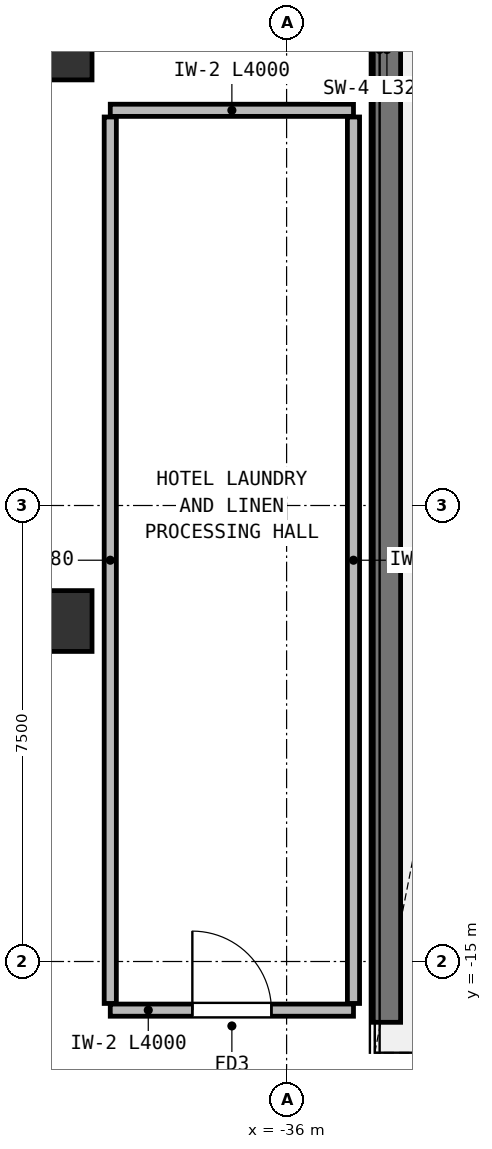
"""IFC4 building model, lengths in metres.
Left out: names, types, materials, properties, quantities, classifications, styles, units other than length and angle.
Written with IfcOpenShell. Run it as: python <this file> out.ifc"""

import sys

from ifc_helpers import new_model, si_unit, direction, frame, frame_2d, origin, origin_2d, place, context, subcontext, project, spatial, rectangle, extrude, element, fill, save


model = new_model("IFC4")
c1 = context("Model", 3, precision=1e-05, world=origin(), true_north=direction((0.0, 1.0)))
c2 = subcontext(c1, "Body", "Model", "MODEL_VIEW")
j1 = project(units=[si_unit("LENGTHUNIT", "METRE"), si_unit("PLANEANGLEUNIT", "RADIAN")], contexts=[c1])
p1 = place(None, origin())
s1 = spatial("IfcSite", under=j1, at=p1, CompositionType="ELEMENT")
p2 = place(p1, origin())
s2 = spatial("IfcBuilding", under=s1, at=p2, CompositionType="ELEMENT")
p3 = place(p2, frame((0.0, 0.0, -9.0)))
s3 = spatial("IfcBuildingStorey", under=s2, at=p3, CompositionType="ELEMENT", Elevation=-9.0)
p4 = place(p3, frame((-34.35, -16.0, 0.0), z_axis=(0.0, 0.0, 1.0), x_axis=(0.0, 1.0, 0.0)))
e1 = element("IfcWall", 1, at=p4, inside=s3, PredefinedType="SHEAR", context=c2, shape_type="SweptSolid", body=[
    extrude(rectangle(XDim=32.0, YDim=0.45, at=frame_2d((16.0, 0.0))), origin(), (0.0, 0.0, 1.0), 1.97),
])
for number, where, z_axis, x_axis in (
    (2, (-39.6, -9.4, 0.0), (0.0, 0.0, 1.0), (1.0, 0.0, 0.0)),
    (3, (-39.6, 0.0, 0.0), (0.0, 0.0, 1.0), (1.0, 0.0, 0.0)),
):
    element("IfcColumn", number, at=place(p3, frame(where, z_axis=z_axis, x_axis=x_axis)), inside=s3, PredefinedType="COLUMN", context=c2, shape_type="SweptSolid", body=[
        extrude(rectangle(XDim=0.8, YDim=1.0, at=origin_2d()), origin(), (0.0, 0.0, 1.0), 4.5),
    ])
p5 = place(p3, frame((-38.9, -1.0, 0.0), z_axis=(0.0, 0.0, 1.0), x_axis=(1.0, 0.0, 0.0)))
e4 = element("IfcWall", 4, at=p5, inside=s3, PredefinedType="PARTITIONING", context=c2, shape_type="SweptSolid", body=[
    extrude(rectangle(XDim=4.0, YDim=0.2, at=frame_2d((2.0, 0.0))), origin(), (0.0, 0.0, 1.0), 4.2),
])
p6 = place(p3, frame((-38.9, -15.8, 0.0), z_axis=(0.0, 0.0, 1.0), x_axis=(1.0, 0.0, 0.0)))
e5 = element("IfcWall", 5, at=p6, inside=s3, PredefinedType="PARTITIONING", context=c2, shape_type="SweptSolid", body=[
    extrude(rectangle(XDim=4.0, YDim=0.2, at=frame_2d((2.0, 0.0))), origin(), (0.0, 0.0, 1.0), 4.2),
])
p7 = place(p6, frame((1.35, 0.0, 0.0)))
e6 = element("IfcOpeningElement", 6, at=p7, cuts=e5, PredefinedType="OPENING", context=c2, shape_type="SweptSolid", body=[
    extrude(rectangle(XDim=1.3, YDim=2.15, at=frame_2d((0.65, 1.075))), frame((0.0, 0.11, 0.0), z_axis=(0.0, -1.0, 0.0), x_axis=(1.0, 0.0, 0.0)), (0.0, 0.0, 1.0), 0.22),
])
for number, where, z_axis, x_axis in (
    (7, (-38.9, -1.11, 0.0), (0.0, 0.0, 1.0), (0.0, -1.0, 0.0)),
    (8, (-34.9, -15.69, 0.0), (0.0, 0.0, 1.0), (0.0, 1.0, 0.0)),
):
    element("IfcWall", number, at=place(p3, frame(where, z_axis=z_axis, x_axis=x_axis)), inside=s3, PredefinedType="PARTITIONING", context=c2, shape_type="SweptSolid", body=[
        extrude(rectangle(XDim=14.58, YDim=0.2, at=frame_2d((7.29, 0.0))), origin(), (0.0, 0.0, 1.0), 4.2),
    ])
p8 = place(p7, origin())
e9 = element("IfcDoor", 9, at=p8, inside=s3, OperationType="SINGLE_SWING_LEFT", PredefinedType="DOOR", context=c2, shape_type="SweptSolid", body=[
    extrude(rectangle(XDim=1.3, YDim=2.15, at=frame_2d((0.65, 1.075))), frame((0.0, 0.025, 0.0), z_axis=(0.0, -1.0, 0.0), x_axis=(1.0, 0.0, 0.0)), (0.0, 0.0, 1.0), 0.05),
])
fill(e6, e9)
save(model, sys.argv[1])
